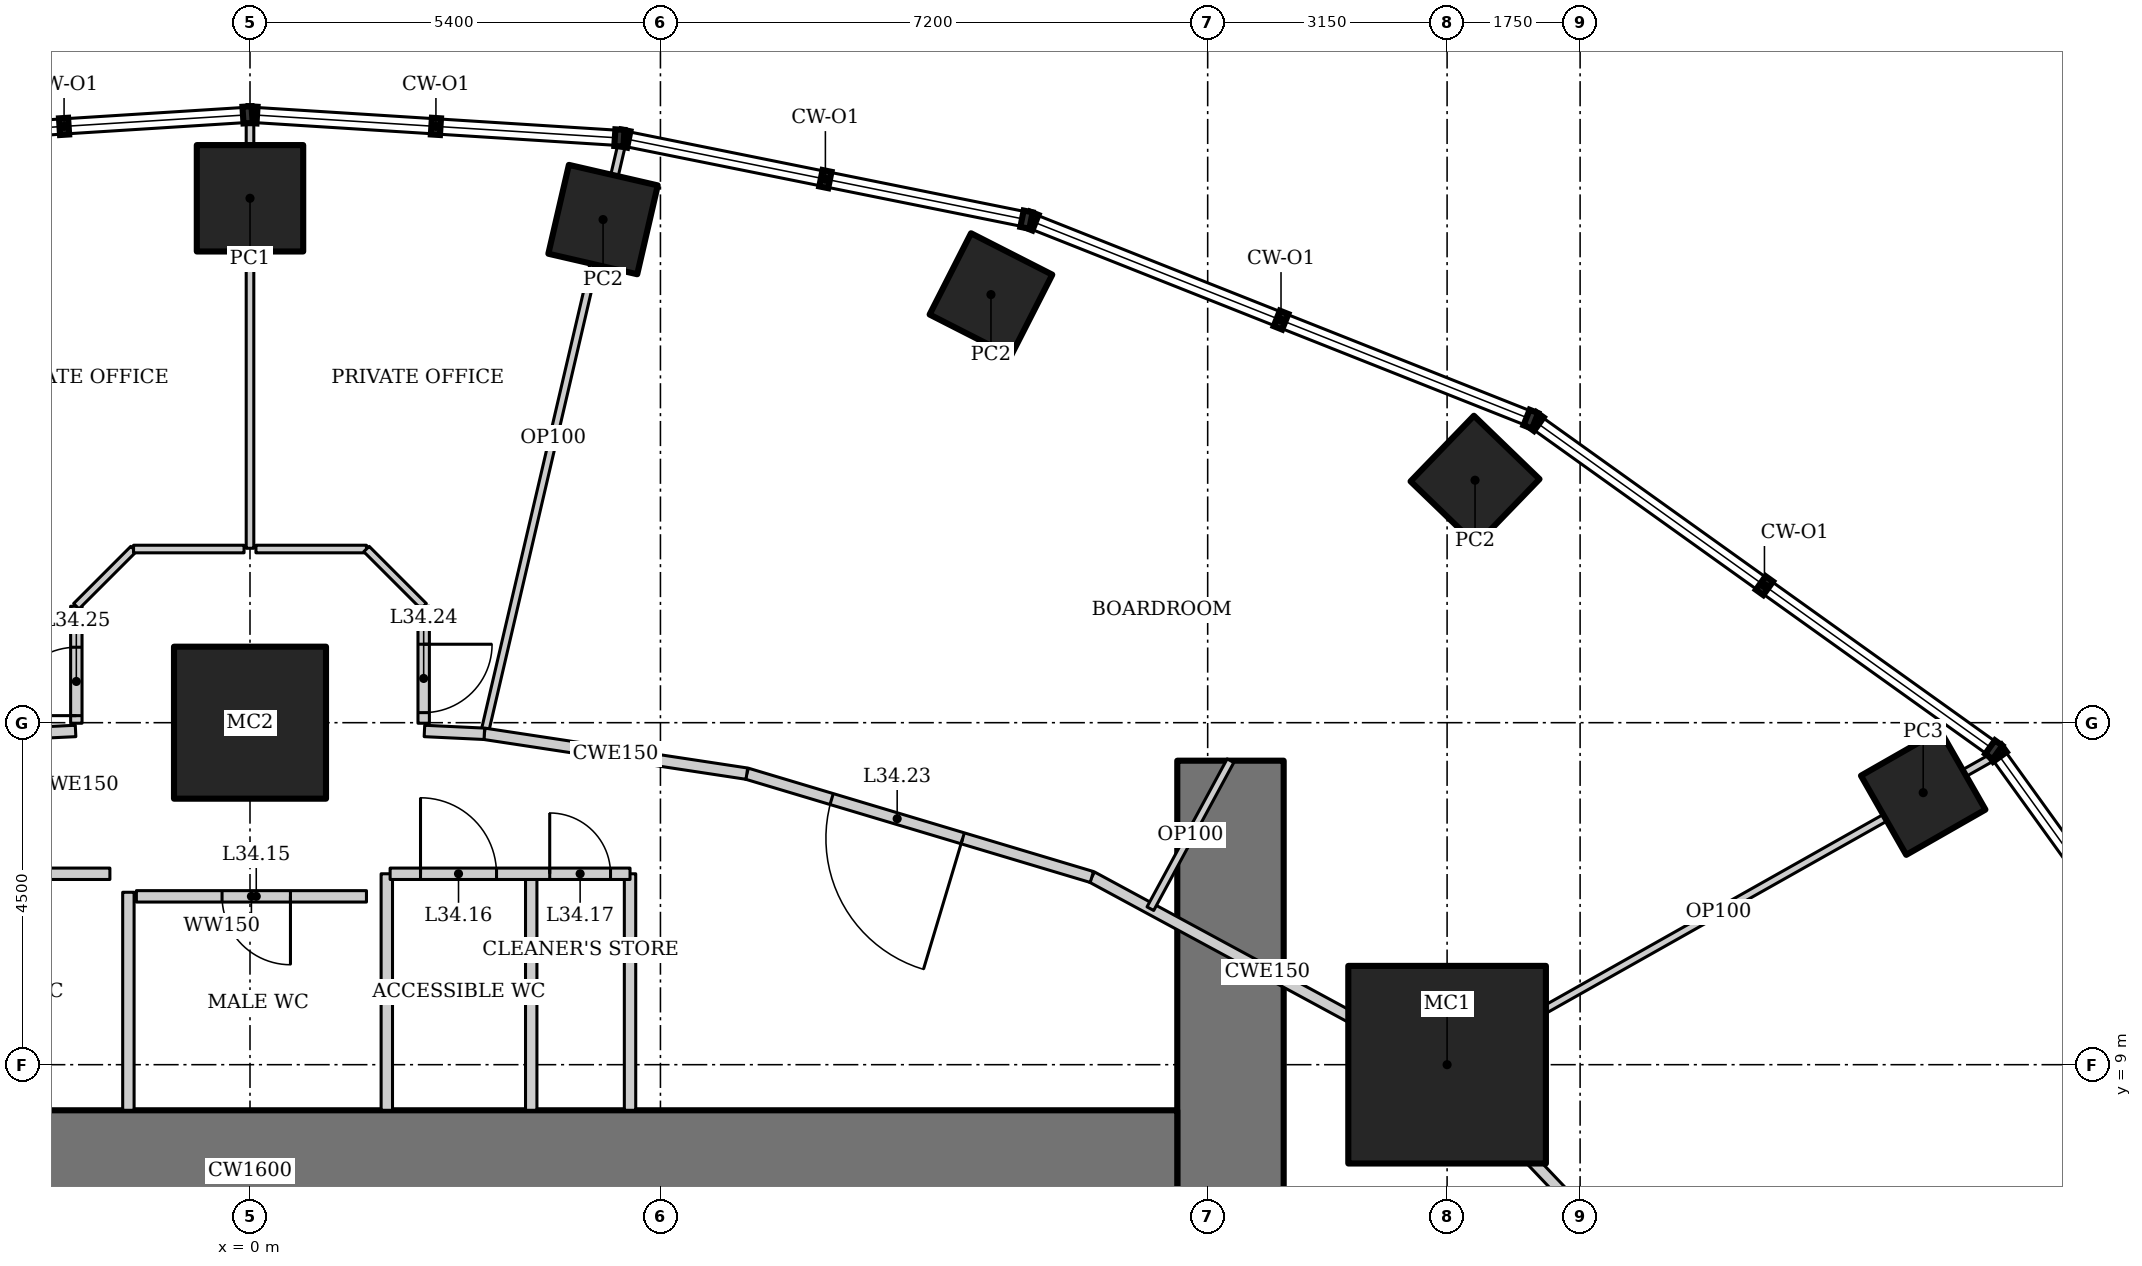
"""IFC4 building model, lengths in metres.
Left out: names, types, materials, properties, quantities, classifications, styles, units other than length and angle.
Written with IfcOpenShell. Run it as: python <this file> out.ifc"""

import sys

from ifc_helpers import new_model, si_unit, direction, frame, frame_2d, origin, origin_2d, place, context, subcontext, project, spatial, rectangle, hollow_rectangle, extrude, element, fill, save


model = new_model("IFC4")
c1 = context("Model", 3, precision=1e-05, world=origin(), true_north=direction((0.0, 1.0)))
c2 = subcontext(c1, "Body", "Model", "MODEL_VIEW")
j1 = project(units=[si_unit("LENGTHUNIT", "METRE"), si_unit("PLANEANGLEUNIT", "RADIAN")], contexts=[c1])
p1 = place(None, origin())
s1 = spatial("IfcSite", under=j1, at=p1, CompositionType="ELEMENT")
p2 = place(p1, origin())
s2 = spatial("IfcBuilding", under=s1, at=p2, CompositionType="ELEMENT")
p3 = place(p2, frame((0.0, 0.0, 146.8)))
s3 = spatial("IfcBuildingStorey", under=s2, at=p3, CompositionType="ELEMENT", Elevation=146.8)
p4 = place(p3, frame((15.75, 9.0, 0.0), z_axis=(0.0, 0.0, 1.0), x_axis=(1.0, 0.0, 0.0)))
e1 = element("IfcColumn", 1, at=p4, inside=s3, PredefinedType="COLUMN", context=c2, shape_type="SweptSolid", body=[
    extrude(hollow_rectangle(XDim=2.6, YDim=2.6, WallThickness=0.13, at=origin_2d()), origin(), (0.0, 0.0, 1.0), 4.2),
])
p5 = place(p3, frame((0.0, 13.5, 0.0), z_axis=(0.0, 0.0, 1.0), x_axis=(1.0, 0.0, 0.0)))
e2 = element("IfcColumn", 2, at=p5, inside=s3, PredefinedType="COLUMN", context=c2, shape_type="SweptSolid", body=[
    extrude(hollow_rectangle(XDim=2.0, YDim=2.0, WallThickness=0.17, at=origin_2d()), origin(), (0.0, 0.0, 1.0), 4.2),
])
p6 = place(p3, frame((22.014, 12.579, 0.0), z_axis=(0.0, 0.0, 1.0), x_axis=(0.86824298017, 0.496139221777, 0.0)))
e3 = element("IfcColumn", 3, at=p6, inside=s3, PredefinedType="COLUMN", context=c2, shape_type="SweptSolid", body=[
    extrude(hollow_rectangle(XDim=1.2, YDim=1.2, WallThickness=0.12, at=origin_2d()), origin(), (0.0, 0.0, 1.0), 4.2),
])
for number, where, z_axis, x_axis in (
    (4, (16.118, 16.69, 0.0), (0.0, 0.0, 1.0), (0.695, 0.719, 0.0)),
    (5, (9.749, 19.133, 0.0), (0.0, 0.0, 1.0), (0.454, 0.891, 0.0)),
    (6, (4.645, 20.12, 0.0), (0.0, 0.0, 1.0), (0.225, 0.974, 0.0)),
):
    element("IfcColumn", number, at=place(p3, frame(where, z_axis=z_axis, x_axis=x_axis)), inside=s3, PredefinedType="COLUMN", context=c2, shape_type="SweptSolid", body=[
        extrude(hollow_rectangle(XDim=1.2, YDim=1.2, WallThickness=0.1, at=origin_2d()), origin(), (0.0, 0.0, 1.0), 4.2),
    ])
p7 = place(p3, frame((0.0, 20.4, 0.0), z_axis=(0.0, 0.0, 1.0), x_axis=(1.0, 0.0, 0.0)))
e7 = element("IfcColumn", 7, at=p7, inside=s3, PredefinedType="COLUMN", context=c2, shape_type="SweptSolid", body=[
    extrude(hollow_rectangle(XDim=1.4, YDim=1.4, WallThickness=0.1, at=origin_2d()), origin(), (0.0, 0.0, 1.0), 4.2),
])
p8 = place(p3, frame((12.9, -13.0, 0.0), z_axis=(0.0, 0.0, 1.0), x_axis=(0.0, 1.0, 0.0)))
e8 = element("IfcWall", 8, at=p8, inside=s3, PredefinedType="SHEAR", context=c2, shape_type="SweptSolid", body=[
    extrude(rectangle(XDim=26.0, YDim=1.4, at=frame_2d((13.0, 0.0))), origin(), (0.0, 0.0, 1.0), 4.2),
])
p9 = place(p8, frame((12.1, 0.0, 0.0)))
e9 = element("IfcOpeningElement", 9, at=p9, cuts=e8, PredefinedType="OPENING", context=c2, shape_type="SweptSolid", body=[
    extrude(rectangle(XDim=1.8, YDim=2.1, at=frame_2d((0.9, 1.05))), frame((0.0, 0.71, 0.0), z_axis=(0.0, -1.0, 0.0), x_axis=(1.0, 0.0, 0.0)), (0.0, 0.0, 1.0), 1.42),
])
p10 = place(p3, frame((12.2, 7.6, 0.0), z_axis=(0.0, 0.0, 1.0), x_axis=(-1.0, 0.0, 0.0)))
e10 = element("IfcWall", 10, at=p10, inside=s3, PredefinedType="SHEAR", context=c2, shape_type="SweptSolid", body=[
    extrude(rectangle(XDim=24.4, YDim=1.6, at=frame_2d((12.2, 0.0))), origin(), (0.0, 0.0, 1.0), 4.2),
])
p11 = place(p3, frame((22.949, 13.059, 0.0), z_axis=(0.0, 0.0, 1.0), x_axis=(-0.871079462611, -0.491142107558, 0.0)))
e11 = element("IfcWall", 11, at=p11, inside=s3, PredefinedType="PARTITIONING", context=c2, shape_type="SweptSolid", body=[
    extrude(rectangle(XDim=8.327, YDim=0.1, at=frame_2d((4.164, 0.0))), origin(), (0.0, 0.0, 1.0), 3.45),
])
p12 = place(p3, frame((4.897, 21.135, 0.0), z_axis=(0.0, 0.0, 1.0), x_axis=(-0.227039313577, -0.973885593943, 0.0)))
e12 = element("IfcWall", 12, at=p12, inside=s3, PredefinedType="PARTITIONING", context=c2, shape_type="SweptSolid", body=[
    extrude(rectangle(XDim=7.99, YDim=0.1, at=frame_2d((3.995, 0.0))), origin(), (0.0, 0.0, 1.0), 3.293),
])
p13 = place(p3, frame((19.579, 4.882, 0.0), z_axis=(0.0, 0.0, 1.0), x_axis=(-0.688797257101, 0.72495402517, 0.0)))
e13 = element("IfcWall", 13, at=p13, inside=s3, PredefinedType="PARTITIONING", context=c2, shape_type="SweptSolid", body=[
    extrude(rectangle(XDim=5.638, YDim=0.15, at=frame_2d((2.819, 0.0))), origin(), (0.0, 0.0, 1.0), 4.05),
])
p14 = place(p13, frame((0.15, 0.0, 0.0)))
e14 = element("IfcOpeningElement", 14, at=p14, cuts=e13, PredefinedType="OPENING", context=c2, shape_type="SweptSolid", body=[
    extrude(rectangle(XDim=0.9, YDim=2.1, at=frame_2d((0.45, 1.05))), frame((0.0, 0.085, 0.0), z_axis=(0.0, -1.0, 0.0), x_axis=(1.0, 0.0, 0.0)), (0.0, 0.0, 1.0), 0.17),
])
p15 = place(p3, frame((15.696, 8.969, 0.0), z_axis=(0.0, 0.0, 1.0), x_axis=(-0.879436285334, 0.476016617397, 0.0)))
e15 = element("IfcWall", 15, at=p15, inside=s3, PredefinedType="PARTITIONING", context=c2, shape_type="SweptSolid", body=[
    extrude(rectangle(XDim=5.253, YDim=0.15, at=frame_2d((2.626, 0.0))), origin(), (0.0, 0.0, 1.0), 4.05),
])
p16 = place(p3, frame((11.076, 11.469, 0.0), z_axis=(0.0, 0.0, 1.0), x_axis=(-0.957933992798, 0.286988615527, 0.0)))
e16 = element("IfcWall", 16, at=p16, inside=s3, PredefinedType="PARTITIONING", context=c2, shape_type="SweptSolid", body=[
    extrude(rectangle(XDim=4.738, YDim=0.15, at=frame_2d((2.369, 0.0))), origin(), (0.0, 0.0, 1.0), 4.05),
])
p17 = place(p16, frame((1.774, 0.0, 0.0)))
e17 = element("IfcOpeningElement", 17, at=p17, cuts=e16, PredefinedType="OPENING", context=c2, shape_type="SweptSolid", body=[
    extrude(rectangle(XDim=1.8, YDim=2.1, at=frame_2d((0.9, 1.05))), frame((0.0, 0.085, 0.0), z_axis=(0.0, -1.0, 0.0), x_axis=(1.0, 0.0, 0.0)), (0.0, 0.0, 1.0), 0.17),
])
p18 = place(p3, frame((6.537, 12.829, 0.0), z_axis=(0.0, 0.0, 1.0), x_axis=(-0.988668719464, 0.150113833987, 0.0)))
e18 = element("IfcWall", 18, at=p18, inside=s3, PredefinedType="PARTITIONING", context=c2, shape_type="SweptSolid", body=[
    extrude(rectangle(XDim=3.493, YDim=0.15, at=frame_2d((1.747, 0.0))), origin(), (0.0, 0.0, 1.0), 4.05),
])
for number, where, z_axis, x_axis in (
    (19, (5.0, 8.4, 0.0), (0.0, 0.0, 1.0), (0.0, 1.0, 0.0)),
    (20, (1.8, 8.4, 0.0), (0.0, 0.0, 1.0), (0.0, 1.0, 0.0)),
    (21, (3.7, 8.4, 0.0), (0.0, 0.0, 1.0), (0.0, 1.0, 0.0)),
):
    element("IfcWall", number, at=place(p3, frame(where, z_axis=z_axis, x_axis=x_axis)), inside=s3, PredefinedType="SOLIDWALL", context=c2, shape_type="SweptSolid", body=[
        extrude(rectangle(XDim=3.112, YDim=0.15, at=frame_2d((1.556, 0.0))), origin(), (0.0, 0.0, 1.0), 4.05),
    ])
p19 = place(p3, frame((12.9, 13.0, 0.0), z_axis=(0.0, 0.0, 1.0), x_axis=(-0.475998959765, -0.879445842734, 0.0)))
e22 = element("IfcWall", 22, at=p19, inside=s3, PredefinedType="PARTITIONING", context=c2, shape_type="SweptSolid", body=[
    extrude(rectangle(XDim=2.214, YDim=0.1, at=frame_2d((1.107, 0.0))), origin(), (0.0, 0.0, 1.0), 4.05),
])
p20 = place(p3, frame((0.0, 21.445, 0.0), z_axis=(0.0, 0.0, 1.0), x_axis=(0.0, -1.0, 0.0)))
e23 = element("IfcWall", 23, at=p20, inside=s3, PredefinedType="PARTITIONING", context=c2, shape_type="SweptSolid", body=[
    extrude(rectangle(XDim=5.65, YDim=0.1, at=frame_2d((2.825, 0.0))), origin(), (0.0, 0.0, 1.0), 3.646),
])
for number, where, z_axis, x_axis in (
    (24, (3.083, 13.354, 0.0), (0.0, 0.0, 1.0), (-0.999, 0.047, 0.0)),
    (25, (-2.295, 13.391, 0.0), (0.0, 0.0, 1.0), (-0.999, -0.047, 0.0)),
):
    element("IfcWall", number, at=place(p3, frame(where, z_axis=z_axis, x_axis=x_axis)), inside=s3, PredefinedType="PARTITIONING", context=c2, shape_type="SweptSolid", body=[
        extrude(rectangle(XDim=0.789, YDim=0.15, at=frame_2d((0.395, 0.0))), origin(), (0.0, 0.0, 1.0), 4.05),
    ])
p21 = place(p3, frame((-5.0, 11.512, 0.0), z_axis=(0.0, 0.0, 1.0), x_axis=(1.0, 0.0, 0.0)))
e26 = element("IfcWall", 26, at=p21, inside=s3, PredefinedType="SOLIDWALL", context=c2, shape_type="SweptSolid", body=[
    extrude(rectangle(XDim=3.156, YDim=0.15, at=frame_2d((1.578, 0.0))), origin(), (0.0, 0.0, 1.0), 4.05),
])
p22 = place(p21, frame((1.25, 0.0, 0.0)))
e27 = element("IfcOpeningElement", 27, at=p22, cuts=e26, PredefinedType="OPENING", context=c2, shape_type="SweptSolid", body=[
    extrude(rectangle(XDim=0.9, YDim=2.1, at=frame_2d((0.45, 1.05))), frame((0.0, 0.085, 0.0), z_axis=(0.0, -1.0, 0.0), x_axis=(1.0, 0.0, 0.0)), (0.0, 0.0, 1.0), 0.17),
])
p23 = place(p3, frame((1.844, 11.512, 0.0), z_axis=(0.0, 0.0, 1.0), x_axis=(1.0, 0.0, 0.0)))
e28 = element("IfcWall", 28, at=p23, inside=s3, PredefinedType="SOLIDWALL", context=c2, shape_type="SweptSolid", body=[
    extrude(rectangle(XDim=3.156, YDim=0.15, at=frame_2d((1.578, 0.0))), origin(), (0.0, 0.0, 1.0), 4.05),
])
p24 = place(p23, frame((0.4, 0.0, 0.0)))
e29 = element("IfcOpeningElement", 29, at=p24, cuts=e28, PredefinedType="OPENING", context=c2, shape_type="SweptSolid", body=[
    extrude(rectangle(XDim=1.0, YDim=2.1, at=frame_2d((0.5, 1.05))), frame((0.0, 0.085, 0.0), z_axis=(0.0, -1.0, 0.0), x_axis=(1.0, 0.0, 0.0)), (0.0, 0.0, 1.0), 0.17),
])
p25 = place(p23, frame((2.1, 0.0, 0.0)))
e30 = element("IfcOpeningElement", 30, at=p25, cuts=e28, PredefinedType="OPENING", context=c2, shape_type="SweptSolid", body=[
    extrude(rectangle(XDim=0.8, YDim=2.1, at=frame_2d((0.4, 1.05))), frame((0.0, 0.085, 0.0), z_axis=(0.0, -1.0, 0.0), x_axis=(1.0, 0.0, 0.0)), (0.0, 0.0, 1.0), 0.17),
])
p26 = place(p3, frame((-1.6, 8.4, 0.0), z_axis=(0.0, 0.0, 1.0), x_axis=(0.0, 1.0, 0.0)))
e31 = element("IfcWall", 31, at=p26, inside=s3, PredefinedType="SOLIDWALL", context=c2, shape_type="SweptSolid", body=[
    extrude(rectangle(XDim=2.869, YDim=0.15, at=frame_2d((1.434, 0.0))), origin(), (0.0, 0.0, 1.0), 4.05),
])
p27 = place(p3, frame((1.532, 11.215, 0.0), z_axis=(0.0, 0.0, 1.0), x_axis=(-1.0, 0.0, 0.0)))
e32 = element("IfcWall", 32, at=p27, inside=s3, PredefinedType="SOLIDWALL", context=c2, shape_type="SweptSolid", body=[
    extrude(rectangle(XDim=3.027, YDim=0.15, at=frame_2d((1.514, 0.0))), origin(), (0.0, 0.0, 1.0), 4.05),
])
p28 = place(p27, frame((1.0, 0.0, 0.0)))
e33 = element("IfcOpeningElement", 33, at=p28, cuts=e32, PredefinedType="OPENING", context=c2, shape_type="SweptSolid", body=[
    extrude(rectangle(XDim=0.9, YDim=2.1, at=frame_2d((0.45, 1.05))), frame((0.0, 0.085, 0.0), z_axis=(0.0, -1.0, 0.0), x_axis=(1.0, 0.0, 0.0)), (0.0, 0.0, 1.0), 0.17),
])
p29 = place(p3, frame((0.078, 15.785, 0.0), z_axis=(0.0, 0.0, 1.0), x_axis=(1.0, 0.0, 0.0)))
e34 = element("IfcWall", 34, at=p29, inside=s3, PredefinedType="PARTITIONING", context=c2, shape_type="SweptSolid", body=[
    extrude(rectangle(XDim=1.454, YDim=0.1, at=frame_2d((0.727, 0.0))), origin(), (0.0, 0.0, 1.0), 4.05),
])
p30 = place(p3, frame((1.532, 15.785, 0.0), z_axis=(0.0, 0.0, 1.0), x_axis=(0.707106781187, -0.707106781187, 0.0)))
e35 = element("IfcWall", 35, at=p30, inside=s3, PredefinedType="PARTITIONING", context=c2, shape_type="SweptSolid", body=[
    extrude(rectangle(XDim=1.064, YDim=0.1, at=frame_2d((0.532, 0.0))), origin(), (0.0, 0.0, 1.0), 4.05),
])
p31 = place(p3, frame((2.285, 15.032, 0.0), z_axis=(0.0, 0.0, 1.0), x_axis=(0.0, -1.0, 0.0)))
e36 = element("IfcWall", 36, at=p31, inside=s3, PredefinedType="PARTITIONING", context=c2, shape_type="SweptSolid", body=[
    extrude(rectangle(XDim=1.54, YDim=0.15, at=frame_2d((0.77, 0.0))), origin(), (0.0, 0.0, 1.0), 4.05),
])
p32 = place(p31, frame((0.5, 0.0, 0.0)))
e37 = element("IfcOpeningElement", 37, at=p32, cuts=e36, PredefinedType="OPENING", context=c2, shape_type="SweptSolid", body=[
    extrude(rectangle(XDim=0.9, YDim=2.1, at=frame_2d((0.45, 1.05))), frame((0.0, 0.085, 0.0), z_axis=(0.0, -1.0, 0.0), x_axis=(1.0, 0.0, 0.0)), (0.0, 0.0, 1.0), 0.17),
])
p33 = place(p3, frame((-2.285, 13.493, 0.0), z_axis=(0.0, 0.0, 1.0), x_axis=(0.0, 1.0, 0.0)))
e38 = element("IfcWall", 38, at=p33, inside=s3, PredefinedType="PARTITIONING", context=c2, shape_type="SweptSolid", body=[
    extrude(rectangle(XDim=1.54, YDim=0.15, at=frame_2d((0.77, 0.0))), origin(), (0.0, 0.0, 1.0), 4.05),
])
p34 = place(p33, frame((0.1, 0.0, 0.0)))
e39 = element("IfcOpeningElement", 39, at=p34, cuts=e38, PredefinedType="OPENING", context=c2, shape_type="SweptSolid", body=[
    extrude(rectangle(XDim=0.9, YDim=2.1, at=frame_2d((0.45, 1.05))), frame((0.0, 0.085, 0.0), z_axis=(0.0, -1.0, 0.0), x_axis=(1.0, 0.0, 0.0)), (0.0, 0.0, 1.0), 0.17),
])
p35 = place(p3, frame((-2.285, 15.032, 0.0), z_axis=(0.0, 0.0, 1.0), x_axis=(0.707106781187, 0.707106781187, 0.0)))
e40 = element("IfcWall", 40, at=p35, inside=s3, PredefinedType="PARTITIONING", context=c2, shape_type="SweptSolid", body=[
    extrude(rectangle(XDim=1.064, YDim=0.1, at=frame_2d((0.532, 0.0))), origin(), (0.0, 0.0, 1.0), 4.05),
])
p36 = place(p3, frame((-1.532, 15.785, 0.0), z_axis=(0.0, 0.0, 1.0), x_axis=(1.0, 0.0, 0.0)))
e41 = element("IfcWall", 41, at=p36, inside=s3, PredefinedType="PARTITIONING", context=c2, shape_type="SweptSolid", body=[
    extrude(rectangle(XDim=1.454, YDim=0.1, at=frame_2d((0.727, 0.0))), origin(), (0.0, 0.0, 1.0), 4.05),
])
p37 = place(p28, origin())
e42 = element("IfcDoor", 42, at=p37, inside=s3, OperationType="SINGLE_SWING_LEFT", PredefinedType="DOOR", context=c2, shape_type="SweptSolid", body=[
    extrude(rectangle(XDim=0.9, YDim=2.1, at=frame_2d((0.45, 1.05))), frame((0.0, 0.025, 0.0), z_axis=(0.0, -1.0, 0.0), x_axis=(1.0, 0.0, 0.0)), (0.0, 0.0, 1.0), 0.05),
])
fill(e33, e42)
p38 = place(p24, origin())
e43 = element("IfcDoor", 43, at=p38, inside=s3, OperationType="SINGLE_SWING_LEFT", PredefinedType="DOOR", context=c2, shape_type="SweptSolid", body=[
    extrude(rectangle(XDim=1.0, YDim=2.1, at=frame_2d((0.5, 1.05))), frame((0.0, 0.025, 0.0), z_axis=(0.0, -1.0, 0.0), x_axis=(1.0, 0.0, 0.0)), (0.0, 0.0, 1.0), 0.05),
])
fill(e29, e43)
p39 = place(p25, origin())
e44 = element("IfcDoor", 44, at=p39, inside=s3, OperationType="SINGLE_SWING_LEFT", PredefinedType="DOOR", context=c2, shape_type="SweptSolid", body=[
    extrude(rectangle(XDim=0.8, YDim=2.1, at=frame_2d((0.4, 1.05))), frame((0.0, 0.025, 0.0), z_axis=(0.0, -1.0, 0.0), x_axis=(1.0, 0.0, 0.0)), (0.0, 0.0, 1.0), 0.05),
])
fill(e30, e44)
p40 = place(p17, origin())
e45 = element("IfcDoor", 45, at=p40, inside=s3, OperationType="DOUBLE_DOOR_DOUBLE_SWING", PredefinedType="DOOR", context=c2, shape_type="SweptSolid", body=[
    extrude(rectangle(XDim=1.8, YDim=2.1, at=frame_2d((0.9, 1.05))), frame((0.0, 0.025, 0.0), z_axis=(0.0, -1.0, 0.0), x_axis=(1.0, 0.0, 0.0)), (0.0, 0.0, 1.0), 0.05),
])
fill(e17, e45)
p41 = place(p32, origin())
e46 = element("IfcDoor", 46, at=p41, inside=s3, OperationType="SINGLE_SWING_LEFT", PredefinedType="DOOR", context=c2, shape_type="SweptSolid", body=[
    extrude(rectangle(XDim=0.9, YDim=2.1, at=frame_2d((0.45, 1.05))), frame((0.0, 0.025, 0.0), z_axis=(0.0, -1.0, 0.0), x_axis=(1.0, 0.0, 0.0)), (0.0, 0.0, 1.0), 0.05),
])
fill(e37, e46)
p42 = place(p34, origin())
e47 = element("IfcDoor", 47, at=p42, inside=s3, OperationType="SINGLE_SWING_LEFT", PredefinedType="DOOR", context=c2, shape_type="SweptSolid", body=[
    extrude(rectangle(XDim=0.9, YDim=2.1, at=frame_2d((0.45, 1.05))), frame((0.0, 0.025, 0.0), z_axis=(0.0, -1.0, 0.0), x_axis=(1.0, 0.0, 0.0)), (0.0, 0.0, 1.0), 0.05),
])
fill(e39, e47)
save(model, sys.argv[1])
